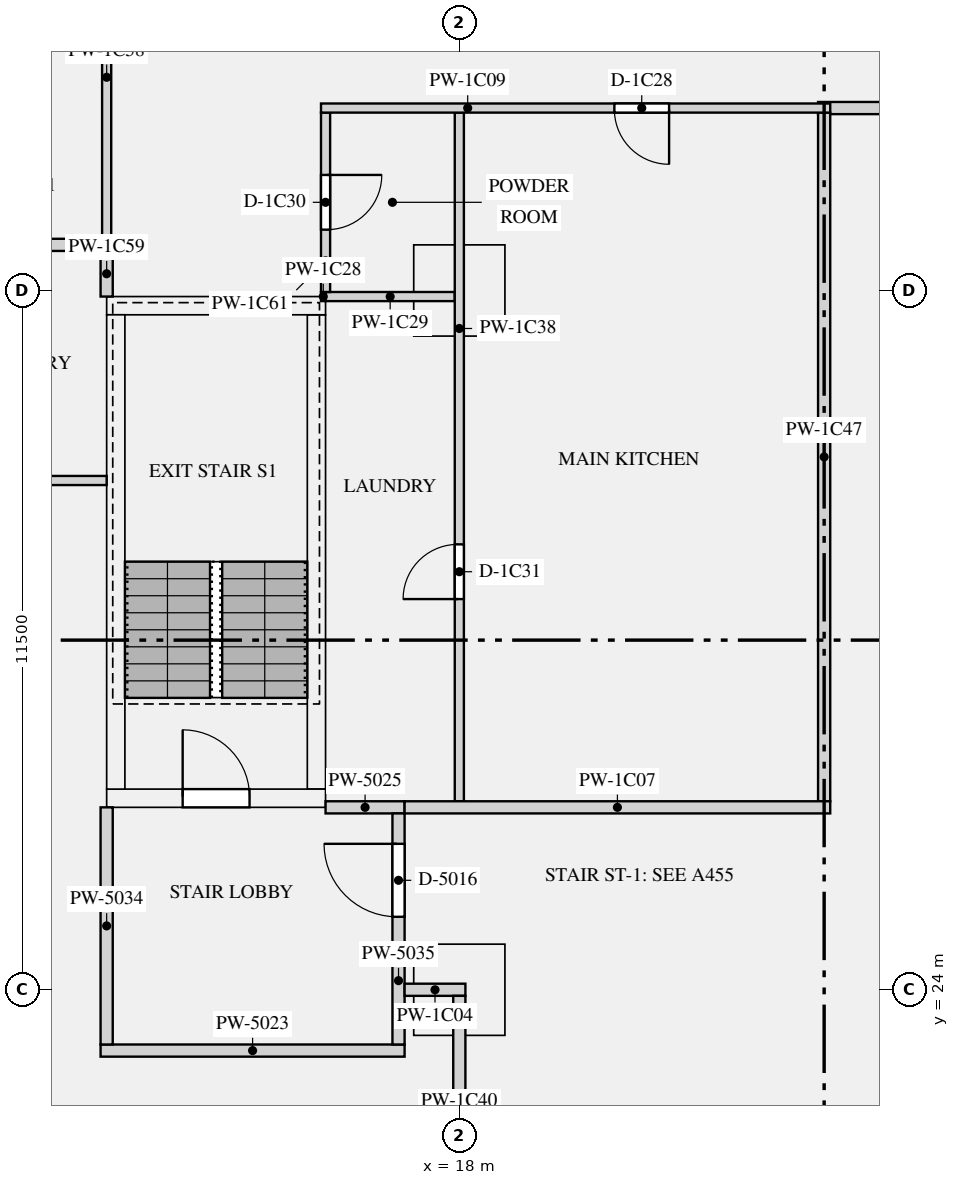
"""IFC4 building model, lengths in metres.
Left out: names, types, materials, properties, quantities, classifications, styles, units other than length and angle.
Written with IfcOpenShell. Run it as: python <this file> out.ifc"""

import sys

from ifc_helpers import new_model, si_unit, direction, frame, frame_2d, origin, origin_2d, place, context, subcontext, project, spatial, rectangle, extrude, element, fill, save


model = new_model("IFC4")
c1 = context("Model", 3, precision=1e-05, world=origin(), true_north=direction((0.0, 1.0)))
c2 = subcontext(c1, "Body", "Model", "MODEL_VIEW")
j1 = project(units=[si_unit("LENGTHUNIT", "METRE"), si_unit("PLANEANGLEUNIT", "RADIAN")], contexts=[c1])
p1 = place(None, origin())
s1 = spatial("IfcSite", under=j1, at=p1, CompositionType="ELEMENT")
p2 = place(p1, origin())
s2 = spatial("IfcBuilding", under=s1, at=p2, CompositionType="ELEMENT")
p3 = place(p2, frame((0.0, 0.0, 38.4)))
s3 = spatial("IfcBuildingStorey", under=s2, at=p3, CompositionType="ELEMENT", Elevation=38.4)
for number, where, z_axis, x_axis in (
    (1, (18.0, 24.0, 0.0), (0.0, 0.0, 1.0), (1.0, 0.0, 0.0)),
    (2, (18.0, 35.5, 0.0), (0.0, 0.0, 1.0), (1.0, 0.0, 0.0)),
):
    element("IfcColumn", number, at=place(p3, frame(where, z_axis=z_axis, x_axis=x_axis)), inside=s3, PredefinedType="COLUMN", context=c2, shape_type="SweptSolid", body=[
        extrude(rectangle(XDim=1.5, YDim=1.5, at=origin_2d()), origin(), (0.0, 0.0, 1.0), 3.15),
    ])
p4 = place(p3, frame((12.2, 27.15, 0.0), z_axis=(0.0, 0.0, 1.0), x_axis=(1.0, 0.0, 0.0)))
e3 = element("IfcWall", 3, at=p4, inside=s3, PredefinedType="SHEAR", context=c2, shape_type="SweptSolid", body=[
    extrude(rectangle(XDim=3.6, YDim=0.3, at=frame_2d((1.8, 0.0))), origin(), (0.0, 0.0, 1.0), 3.15),
])
p5 = place(p4, frame((1.25, 0.0, 0.0)))
e4 = element("IfcOpeningElement", 4, at=p5, cuts=e3, PredefinedType="OPENING", context=c2, shape_type="SweptSolid", body=[
    extrude(rectangle(XDim=1.1, YDim=2.1, at=frame_2d((0.55, 1.05))), frame((0.0, 0.16, 0.0), z_axis=(0.0, -1.0, 0.0), x_axis=(1.0, 0.0, 0.0)), (0.0, 0.0, 1.0), 0.32),
])
p6 = place(p3, frame((12.2, 35.25, 0.0), z_axis=(0.0, 0.0, 1.0), x_axis=(1.0, 0.0, 0.0)))
e5 = element("IfcWall", 5, at=p6, inside=s3, PredefinedType="SHEAR", context=c2, shape_type="SweptSolid", body=[
    extrude(rectangle(XDim=3.6, YDim=0.3, at=frame_2d((1.8, 0.0))), origin(), (0.0, 0.0, 1.0), 3.15),
])
for number, where, z_axis, x_axis in (
    (6, (12.35, 27.3, 0.0), (0.0, 0.0, 1.0), (0.0, 1.0, 0.0)),
    (7, (15.65, 27.3, 0.0), (0.0, 0.0, 1.0), (0.0, 1.0, 0.0)),
):
    element("IfcWall", number, at=place(p3, frame(where, z_axis=z_axis, x_axis=x_axis)), inside=s3, PredefinedType="SHEAR", context=c2, shape_type="SweptSolid", body=[
        extrude(rectangle(XDim=7.8, YDim=0.3, at=frame_2d((3.9, 0.0))), origin(), (0.0, 0.0, 1.0), 3.15),
    ])
p7 = place(p3, frame((12.1, 23.0, 0.0), z_axis=(0.0, 0.0, 1.0), x_axis=(1.0, 0.0, 0.0)))
e8 = element("IfcWall", 8, at=p7, inside=s3, PredefinedType="PARTITIONING", context=c2, shape_type="SweptSolid", body=[
    extrude(rectangle(XDim=5.0, YDim=0.2, at=frame_2d((2.5, 0.0))), origin(), (0.0, 0.0, 1.0), 2.83),
])
p8 = place(p3, frame((15.8, 27.0, 0.0), z_axis=(0.0, 0.0, 1.0), x_axis=(1.0, 0.0, 0.0)))
e9 = element("IfcWall", 9, at=p8, inside=s3, PredefinedType="PARTITIONING", context=c2, shape_type="SweptSolid", body=[
    extrude(rectangle(XDim=1.3, YDim=0.2, at=frame_2d((0.65, 0.0))), origin(), (0.0, 0.0, 1.0), 2.83),
])
p9 = place(p3, frame((12.2, 23.1, 0.0), z_axis=(0.0, 0.0, 1.0), x_axis=(0.0, 1.0, 0.0)))
e10 = element("IfcWall", 10, at=p9, inside=s3, PredefinedType="PARTITIONING", context=c2, shape_type="SweptSolid", body=[
    extrude(rectangle(XDim=3.9, YDim=0.2, at=frame_2d((1.95, 0.0))), origin(), (0.0, 0.0, 1.0), 2.83),
])
p10 = place(p3, frame((17.0, 23.1, 0.0), z_axis=(0.0, 0.0, 1.0), x_axis=(0.0, 1.0, 0.0)))
e11 = element("IfcWall", 11, at=p10, inside=s3, PredefinedType="PARTITIONING", context=c2, shape_type="SweptSolid", body=[
    extrude(rectangle(XDim=3.8, YDim=0.2, at=frame_2d((1.9, 0.0))), origin(), (0.0, 0.0, 1.0), 2.83),
])
p11 = place(p10, frame((2.1, 0.0, 0.0)))
e12 = element("IfcOpeningElement", 12, at=p11, cuts=e11, PredefinedType="OPENING", context=c2, shape_type="SweptSolid", body=[
    extrude(rectangle(XDim=1.2, YDim=2.1, at=frame_2d((0.6, 1.05))), frame((0.0, 0.11, 0.0), z_axis=(0.0, -1.0, 0.0), x_axis=(1.0, 0.0, 0.0)), (0.0, 0.0, 1.0), 0.22),
])
p12 = place(p3, frame((17.1, 24.0, 0.0), z_axis=(0.0, 0.0, 1.0), x_axis=(1.0, 0.0, 0.0)))
e13 = element("IfcWall", 13, at=p12, inside=s3, PredefinedType="PARTITIONING", context=c2, shape_type="SweptSolid", body=[
    extrude(rectangle(XDim=1.0, YDim=0.2, at=frame_2d((0.5, 0.0))), origin(), (0.0, 0.0, 1.0), 2.83),
])
p13 = place(p3, frame((17.1, 27.0, 0.0), z_axis=(0.0, 0.0, 1.0), x_axis=(1.0, 0.0, 0.0)))
e14 = element("IfcWall", 14, at=p13, inside=s3, PredefinedType="PARTITIONING", context=c2, shape_type="SweptSolid", body=[
    extrude(rectangle(XDim=7.0, YDim=0.2, at=frame_2d((3.5, 0.0))), origin(), (0.0, 0.0, 1.0), 2.83),
])
p14 = place(p3, frame((15.725, 38.5, 0.0), z_axis=(0.0, 0.0, 1.0), x_axis=(1.0, 0.0, 0.0)))
e15 = element("IfcWall", 15, at=p14, inside=s3, PredefinedType="PARTITIONING", context=c2, shape_type="SweptSolid", body=[
    extrude(rectangle(XDim=8.375, YDim=0.15, at=frame_2d((4.188, 0.0))), origin(), (0.0, 0.0, 1.0), 2.83),
])
p15 = place(p14, frame((4.825, 0.0, 0.0)))
e16 = element("IfcOpeningElement", 16, at=p15, cuts=e15, PredefinedType="OPENING", context=c2, shape_type="SweptSolid", body=[
    extrude(rectangle(XDim=0.9, YDim=2.1, at=frame_2d((0.45, 1.05))), frame((0.0, 0.085, 0.0), z_axis=(0.0, -1.0, 0.0), x_axis=(1.0, 0.0, 0.0)), (0.0, 0.0, 1.0), 0.17),
])
p16 = place(p3, frame((23.9, 38.5, 0.0), z_axis=(0.0, 0.0, 1.0), x_axis=(1.0, 0.0, 0.0)))
e17 = element("IfcWall", 17, at=p16, inside=s3, PredefinedType="PARTITIONING", context=c2, shape_type="SweptSolid", body=[
    extrude(rectangle(XDim=24.2, YDim=0.2, at=frame_2d((12.1, 0.0))), origin(), (0.0, 0.0, 1.0), 2.83),
])
p17 = place(p16, frame((3.55, 0.0, 0.0)))
e18 = element("IfcOpeningElement", 18, at=p17, cuts=e17, PredefinedType="OPENING", context=c2, shape_type="SweptSolid", body=[
    extrude(rectangle(XDim=1.1, YDim=2.1, at=frame_2d((0.55, 1.05))), frame((0.0, 0.11, 0.0), z_axis=(0.0, -1.0, 0.0), x_axis=(1.0, 0.0, 0.0)), (0.0, 0.0, 1.0), 0.22),
])
p18 = place(p3, frame((0.8, 32.375, 0.0), z_axis=(0.0, 0.0, 1.0), x_axis=(1.0, 0.0, 0.0)))
e19 = element("IfcWall", 19, at=p18, inside=s3, PredefinedType="PARTITIONING", context=c2, shape_type="SweptSolid", body=[
    extrude(rectangle(XDim=11.4, YDim=0.15, at=frame_2d((5.7, 0.0))), origin(), (0.0, 0.0, 1.0), 2.83),
])
p19 = place(p18, frame((9.35, 0.0, 0.0)))
e20 = element("IfcOpeningElement", 20, at=p19, cuts=e19, PredefinedType="OPENING", context=c2, shape_type="SweptSolid", body=[
    extrude(rectangle(XDim=0.9, YDim=2.1, at=frame_2d((0.45, 1.05))), frame((0.0, 0.085, 0.0), z_axis=(0.0, -1.0, 0.0), x_axis=(1.0, 0.0, 0.0)), (0.0, 0.0, 1.0), 0.17),
])
p20 = place(p3, frame((0.8, 36.25, 0.0), z_axis=(0.0, 0.0, 1.0), x_axis=(1.0, 0.0, 0.0)))
e21 = element("IfcWall", 21, at=p20, inside=s3, PredefinedType="PARTITIONING", context=c2, shape_type="SweptSolid", body=[
    extrude(rectangle(XDim=11.475, YDim=0.2, at=frame_2d((5.737, 0.0))), origin(), (0.0, 0.0, 1.0), 2.83),
])
p21 = place(p3, frame((15.725, 35.4, 0.0), z_axis=(0.0, 0.0, 1.0), x_axis=(1.0, 0.0, 0.0)))
e22 = element("IfcWall", 22, at=p21, inside=s3, PredefinedType="PARTITIONING", context=c2, shape_type="SweptSolid", body=[
    extrude(rectangle(XDim=0.075, YDim=0.15, at=frame_2d((0.038, 0.0))), origin(), (0.0, 0.0, 1.0), 2.83),
])
p22 = place(p3, frame((15.8, 35.4, 0.0), z_axis=(0.0, 0.0, 1.0), x_axis=(1.0, 0.0, 0.0)))
e23 = element("IfcWall", 23, at=p22, inside=s3, PredefinedType="PARTITIONING", context=c2, shape_type="SweptSolid", body=[
    extrude(rectangle(XDim=2.125, YDim=0.15, at=frame_2d((1.062, 0.0))), origin(), (0.0, 0.0, 1.0), 2.83),
])
p23 = place(p3, frame((18.0, 27.1, 0.0), z_axis=(0.0, 0.0, 1.0), x_axis=(0.0, 1.0, 0.0)))
e24 = element("IfcWall", 24, at=p23, inside=s3, PredefinedType="PARTITIONING", context=c2, shape_type="SweptSolid", body=[
    extrude(rectangle(XDim=11.325, YDim=0.15, at=frame_2d((5.663, 0.0))), origin(), (0.0, 0.0, 1.0), 2.83),
])
p24 = place(p23, frame((3.325, 0.0, 0.0)))
e25 = element("IfcOpeningElement", 25, at=p24, cuts=e24, PredefinedType="OPENING", context=c2, shape_type="SweptSolid", body=[
    extrude(rectangle(XDim=0.9, YDim=2.1, at=frame_2d((0.45, 1.05))), frame((0.0, 0.085, 0.0), z_axis=(0.0, -1.0, 0.0), x_axis=(1.0, 0.0, 0.0)), (0.0, 0.0, 1.0), 0.17),
])
p25 = place(p3, frame((18.0, 16.1, 0.0), z_axis=(0.0, 0.0, 1.0), x_axis=(0.0, 1.0, 0.0)))
e26 = element("IfcWall", 26, at=p25, inside=s3, PredefinedType="PARTITIONING", context=c2, shape_type="SweptSolid", body=[
    extrude(rectangle(XDim=7.8, YDim=0.2, at=frame_2d((3.9, 0.0))), origin(), (0.0, 0.0, 1.0), 2.83),
])
p26 = place(p25, frame((2.35, 0.0, 0.0)))
e27 = element("IfcOpeningElement", 27, at=p26, cuts=e26, PredefinedType="OPENING", context=c2, shape_type="SweptSolid", body=[
    extrude(rectangle(XDim=1.1, YDim=2.1, at=frame_2d((0.55, 1.05))), frame((0.0, 0.11, 0.0), z_axis=(0.0, -1.0, 0.0), x_axis=(1.0, 0.0, 0.0)), (0.0, 0.0, 1.0), 0.22),
])
p27 = place(p3, frame((24.0, 27.1, 0.0), z_axis=(0.0, 0.0, 1.0), x_axis=(0.0, 1.0, 0.0)))
e28 = element("IfcWall", 28, at=p27, inside=s3, PredefinedType="PARTITIONING", context=c2, shape_type="SweptSolid", body=[
    extrude(rectangle(XDim=11.325, YDim=0.2, at=frame_2d((5.663, 0.0))), origin(), (0.0, 0.0, 1.0), 2.83),
])
p28 = place(p3, frame((12.2, 36.35, 0.0), z_axis=(0.0, 0.0, 1.0), x_axis=(0.0, 1.0, 0.0)))
e29 = element("IfcWall", 29, at=p28, inside=s3, PredefinedType="PARTITIONING", context=c2, shape_type="SweptSolid", body=[
    extrude(rectangle(XDim=7.575, YDim=0.15, at=frame_2d((3.788, 0.0))), origin(), (0.0, 0.0, 1.0), 2.83),
])
p29 = place(p28, frame((5.312, 0.0, 0.0)))
e30 = element("IfcOpeningElement", 30, at=p29, cuts=e29, PredefinedType="OPENING", context=c2, shape_type="SweptSolid", body=[
    extrude(rectangle(XDim=0.8, YDim=2.1, at=frame_2d((0.4, 1.05))), frame((0.0, 0.085, 0.0), z_axis=(0.0, -1.0, 0.0), x_axis=(1.0, 0.0, 0.0)), (0.0, 0.0, 1.0), 0.17),
])
p30 = place(p3, frame((12.2, 35.4, 0.0), z_axis=(0.0, 0.0, 1.0), x_axis=(0.0, 1.0, 0.0)))
e31 = element("IfcWall", 31, at=p30, inside=s3, PredefinedType="PARTITIONING", context=c2, shape_type="SweptSolid", body=[
    extrude(rectangle(XDim=0.75, YDim=0.2, at=frame_2d((0.375, 0.0))), origin(), (0.0, 0.0, 1.0), 2.83),
])
p31 = place(p3, frame((15.8, 35.475, 0.0), z_axis=(0.0, 0.0, 1.0), x_axis=(0.0, 1.0, 0.0)))
e32 = element("IfcWall", 32, at=p31, inside=s3, PredefinedType="PARTITIONING", context=c2, shape_type="SweptSolid", body=[
    extrude(rectangle(XDim=2.95, YDim=0.15, at=frame_2d((1.475, 0.0))), origin(), (0.0, 0.0, 1.0), 2.83),
])
p32 = place(p31, frame((1.025, 0.0, 0.0)))
e33 = element("IfcOpeningElement", 33, at=p32, cuts=e32, PredefinedType="OPENING", context=c2, shape_type="SweptSolid", body=[
    extrude(rectangle(XDim=0.9, YDim=2.1, at=frame_2d((0.45, 1.05))), frame((0.0, 0.085, 0.0), z_axis=(0.0, -1.0, 0.0), x_axis=(1.0, 0.0, 0.0)), (0.0, 0.0, 1.0), 0.17),
])
p33 = place(p5, origin())
e34 = element("IfcDoor", 34, at=p33, inside=s3, OperationType="SINGLE_SWING_LEFT", PredefinedType="DOOR", context=c2, shape_type="SweptSolid", body=[
    extrude(rectangle(XDim=1.1, YDim=2.1, at=frame_2d((0.55, 1.05))), frame((0.0, 0.025, 0.0), z_axis=(0.0, -1.0, 0.0), x_axis=(1.0, 0.0, 0.0)), (0.0, 0.0, 1.0), 0.05),
])
fill(e4, e34)
p34 = place(p11, origin())
e35 = element("IfcDoor", 35, at=p34, inside=s3, OperationType="SINGLE_SWING_RIGHT", PredefinedType="DOOR", context=c2, shape_type="SweptSolid", body=[
    extrude(rectangle(XDim=1.2, YDim=2.1, at=frame_2d((0.6, 1.05))), frame((0.0, 0.025, 0.0), z_axis=(0.0, -1.0, 0.0), x_axis=(1.0, 0.0, 0.0)), (0.0, 0.0, 1.0), 0.05),
])
fill(e12, e35)
p35 = place(p15, frame((0.9, 0.0, 0.0), z_axis=(0.0, 0.0, 1.0), x_axis=(-1.0, 0.0, 0.0)))
e36 = element("IfcDoor", 36, at=p35, inside=s3, OperationType="SINGLE_SWING_LEFT", PredefinedType="DOOR", context=c2, shape_type="SweptSolid", body=[
    extrude(rectangle(XDim=0.9, YDim=2.1, at=frame_2d((0.45, 1.05))), frame((0.0, 0.025, 0.0), z_axis=(0.0, -1.0, 0.0), x_axis=(1.0, 0.0, 0.0)), (0.0, 0.0, 1.0), 0.05),
])
fill(e16, e36)
p36 = place(p32, frame((0.9, 0.0, 0.0), z_axis=(0.0, 0.0, 1.0), x_axis=(-1.0, 0.0, 0.0)))
e37 = element("IfcDoor", 37, at=p36, inside=s3, OperationType="SINGLE_SWING_LEFT", PredefinedType="DOOR", context=c2, shape_type="SweptSolid", body=[
    extrude(rectangle(XDim=0.9, YDim=2.1, at=frame_2d((0.45, 1.05))), frame((0.0, 0.025, 0.0), z_axis=(0.0, -1.0, 0.0), x_axis=(1.0, 0.0, 0.0)), (0.0, 0.0, 1.0), 0.05),
])
fill(e33, e37)
p37 = place(p24, origin())
e38 = element("IfcDoor", 38, at=p37, inside=s3, OperationType="SINGLE_SWING_LEFT", PredefinedType="DOOR", context=c2, shape_type="SweptSolid", body=[
    extrude(rectangle(XDim=0.9, YDim=2.1, at=frame_2d((0.45, 1.05))), frame((0.0, 0.025, 0.0), z_axis=(0.0, -1.0, 0.0), x_axis=(1.0, 0.0, 0.0)), (0.0, 0.0, 1.0), 0.05),
])
fill(e25, e38)
save(model, sys.argv[1])
